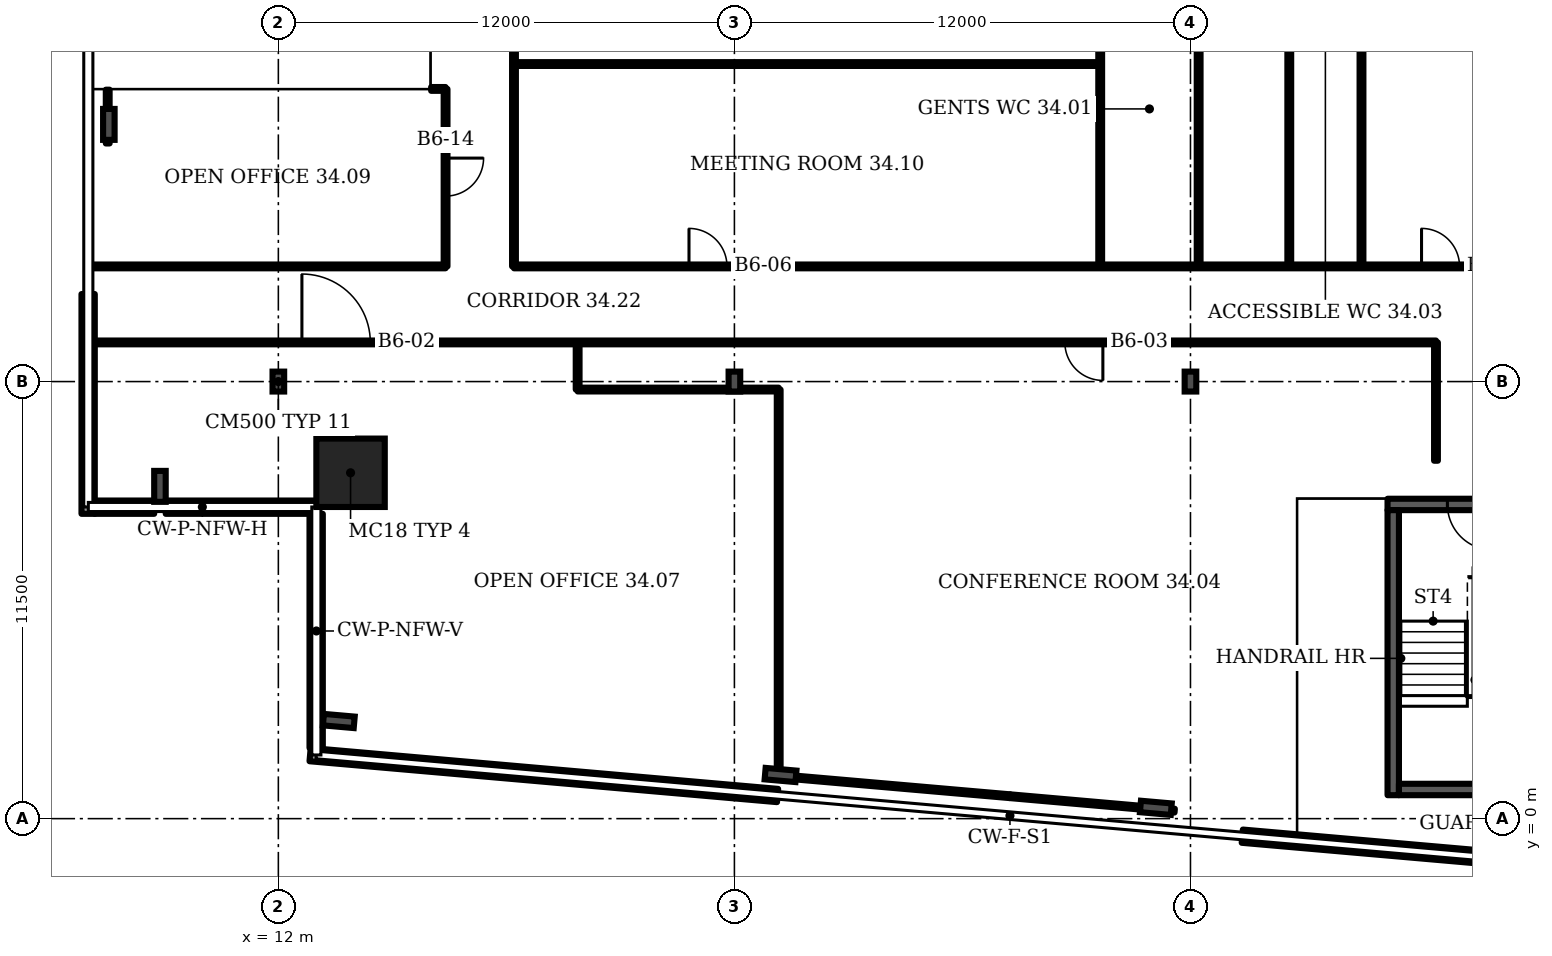
"""IFC4 building model, lengths in metres.
Left out: names, types, materials, properties, quantities, classifications, styles, units other than length and angle.
Written with IfcOpenShell. Run it as: python <this file> out.ifc"""

import sys

from ifc_helpers import new_model, si_unit, direction, frame, frame_2d, origin, origin_2d, place, context, subcontext, project, spatial, rectangle, i_section, extrude, element, fill, save


model = new_model("IFC4")
c1 = context("Model", 3, precision=1e-05, world=origin(), true_north=direction((0.0, 1.0)))
c2 = subcontext(c1, "Body", "Model", "MODEL_VIEW")
j1 = project(units=[si_unit("LENGTHUNIT", "METRE"), si_unit("PLANEANGLEUNIT", "RADIAN")], contexts=[c1])
p1 = place(None, origin())
s1 = spatial("IfcSite", under=j1, at=p1, CompositionType="ELEMENT")
p2 = place(p1, origin())
s2 = spatial("IfcBuilding", under=s1, at=p2, CompositionType="ELEMENT")
p3 = place(p2, frame((0.0, 0.0, 143.5)))
s3 = spatial("IfcBuildingStorey", under=s2, at=p3, CompositionType="ELEMENT", Elevation=143.5)
p4 = place(p3, frame((13.9, 9.1, 0.0), z_axis=(0.0, 0.0, 1.0), x_axis=(1.0, 0.0, 0.0)))
e1 = element("IfcColumn", 1, at=p4, inside=s3, PredefinedType="COLUMN", context=c2, shape_type="SweptSolid", body=[
    extrude(rectangle(XDim=1.8, YDim=1.8, at=origin_2d()), origin(), (0.0, 0.0, 1.0), 3.6),
])
for number, where, z_axis, x_axis in (
    (2, (13.591, 2.569, 0.0), (0.0, 0.0, 1.0), (-0.087, -0.996, 0.0)),
    (3, (25.214, 1.149, 0.0), (0.0, 0.0, 1.0), (-0.087, -0.996, 0.0)),
    (4, (35.089, 0.285, 0.0), (0.0, 0.0, 1.0), (-0.087, -0.996, 0.0)),
    (5, (7.54, 18.267, 0.0), (0.0, 0.0, 1.0), (-1.0, 0.0, 0.0)),
    (6, (8.885, 8.743, 0.0), (0.0, 0.0, 1.0), (-1.0, 0.0, 0.0)),
):
    element("IfcColumn", number, at=place(p3, frame(where, z_axis=z_axis, x_axis=x_axis)), inside=s3, PredefinedType="COLUMN", context=c2, shape_type="SweptSolid", body=[
        extrude(i_section(OverallWidth=0.303, OverallDepth=0.814, WebThickness=0.021, FlangeThickness=0.04, FilletRadius=0.03, at=origin_2d()), origin(), (0.0, 0.0, 1.0), 3.6),
    ])
for number, where, z_axis, x_axis in (
    (7, (12.0, 11.5, 0.0), (0.0, 0.0, 1.0), (1.0, 0.0, 0.0)),
    (8, (24.0, 11.5, 0.0), (0.0, 0.0, 1.0), (1.0, 0.0, 0.0)),
    (9, (36.0, 11.5, 0.0), (0.0, 0.0, 1.0), (1.0, 0.0, 0.0)),
):
    element("IfcColumn", number, at=place(p3, frame(where, z_axis=z_axis, x_axis=x_axis)), inside=s3, PredefinedType="COLUMN", context=c2, shape_type="SweptSolid", body=[
        extrude(i_section(OverallWidth=0.306, OverallDepth=0.524, WebThickness=0.021, FlangeThickness=0.04, FilletRadius=0.027, at=origin_2d()), origin(), (0.0, 0.0, 1.0), 3.6),
    ])
p5 = place(p3, frame((12.835, 1.685, 0.0), z_axis=(0.0, 0.0, 1.0), x_axis=(0.996192, -0.087173, 0.0)))
e10 = element("IfcWall", 10, at=p5, inside=s3, PredefinedType="SOLIDWALL", context=c2, shape_type="SweptSolid", body=[
    extrude(rectangle(XDim=12.348, YDim=0.35, at=frame_2d((6.174, 0.0))), origin(), (0.0, 0.0, 1.0), 1.0),
])
p6 = place(p3, frame((37.363, -0.461, 0.0), z_axis=(0.0, 0.0, 1.0), x_axis=(0.996194, -0.087159, 0.0)))
e11 = element("IfcWall", 11, at=p6, inside=s3, PredefinedType="SOLIDWALL", context=c2, shape_type="SweptSolid", body=[
    extrude(rectangle(XDim=12.199, YDim=0.35, at=frame_2d((6.099, 0.0))), origin(), (0.0, 0.0, 1.0), 1.0),
])
p7 = place(p3, frame((6.995, 13.803, 0.0), z_axis=(0.0, 0.0, 1.0), x_axis=(0.0, -1.0, 0.0)))
e12 = element("IfcWall", 12, at=p7, inside=s3, PredefinedType="SOLIDWALL", context=c2, shape_type="SweptSolid", body=[
    extrude(rectangle(XDim=5.783, YDim=0.35, at=frame_2d((2.892, 0.0))), origin(), (0.0, 0.0, 1.0), 1.0),
])
p8 = place(p3, frame((7.17, 8.195, 0.0), z_axis=(0.0, 0.0, 1.0), x_axis=(1.0, 0.0, 0.0)))
e13 = element("IfcWall", 13, at=p8, inside=s3, PredefinedType="SOLIDWALL", context=c2, shape_type="SweptSolid", body=[
    extrude(rectangle(XDim=1.563, YDim=0.35, at=frame_2d((0.782, 0.0))), origin(), (0.0, 0.0, 1.0), 1.0),
])
p9 = place(p3, frame((9.036, 8.195, 0.0), z_axis=(0.0, 0.0, 1.0), x_axis=(1.0, 0.0, 0.0)))
e14 = element("IfcWall", 14, at=p9, inside=s3, PredefinedType="SOLIDWALL", context=c2, shape_type="SweptSolid", body=[
    extrude(rectangle(XDim=3.964, YDim=0.35, at=frame_2d((1.982, 0.0))), origin(), (0.0, 0.0, 1.0), 1.0),
])
p10 = place(p3, frame((12.995, 8.02, 0.0), z_axis=(0.0, 0.0, 1.0), x_axis=(0.0, -1.0, 0.0)))
e15 = element("IfcWall", 15, at=p10, inside=s3, PredefinedType="SOLIDWALL", context=c2, shape_type="SweptSolid", body=[
    extrude(rectangle(XDim=6.161, YDim=0.35, at=frame_2d((3.081, 0.0))), origin(), (0.0, 0.0, 1.0), 1.0),
])
p11 = place(p3, frame((41.185, 8.267, 0.0), z_axis=(0.0, 0.0, 1.0), x_axis=(1.0, 0.0, 0.0)))
e16 = element("IfcWall", 16, at=p11, inside=s3, PredefinedType="SHEAR", context=c2, shape_type="SweptSolid", body=[
    extrude(rectangle(XDim=4.35, YDim=0.3, at=frame_2d((2.175, 0.0))), origin(), (0.0, 0.0, 1.0), 3.15),
])
p12 = place(p11, frame((1.575, 0.0, 0.0)))
e17 = element("IfcOpeningElement", 17, at=p12, cuts=e16, PredefinedType="OPENING", context=c2, shape_type="SweptSolid", body=[
    extrude(rectangle(XDim=1.2, YDim=2.1, at=frame_2d((0.6, 1.05))), frame((0.0, 0.16, 0.0), z_axis=(0.0, -1.0, 0.0), x_axis=(1.0, 0.0, 0.0)), (0.0, 0.0, 1.0), 0.32),
])
p13 = place(p3, frame((7.02, 12.53, 0.0), z_axis=(0.0, 0.0, 1.0), x_axis=(1.0, 0.0, 0.0)))
e18 = element("IfcWall", 18, at=p13, inside=s3, PredefinedType="PARTITIONING", context=c2, shape_type="SweptSolid", body=[
    extrude(rectangle(XDim=35.44, YDim=0.1, at=frame_2d((17.72, 0.0))), origin(), (0.0, 0.0, 1.0), 3.15),
])
p14 = place(p13, frame((5.6, 0.0, 0.0)))
e19 = element("IfcOpeningElement", 19, at=p14, cuts=e18, PredefinedType="OPENING", context=c2, shape_type="SweptSolid", body=[
    extrude(rectangle(XDim=1.8, YDim=2.1, at=frame_2d((0.9, 1.05))), frame((0.0, 0.06, 0.0), z_axis=(0.0, -1.0, 0.0), x_axis=(1.0, 0.0, 0.0)), (0.0, 0.0, 1.0), 0.12),
])
p15 = place(p13, frame((25.675, 0.0, 0.0)))
e20 = element("IfcOpeningElement", 20, at=p15, cuts=e18, PredefinedType="OPENING", context=c2, shape_type="SweptSolid", body=[
    extrude(rectangle(XDim=1.0, YDim=2.1, at=frame_2d((0.5, 1.05))), frame((0.0, 0.06, 0.0), z_axis=(0.0, -1.0, 0.0), x_axis=(1.0, 0.0, 0.0)), (0.0, 0.0, 1.0), 0.12),
])
p16 = place(p3, frame((7.02, 14.53, 0.0), z_axis=(0.0, 0.0, 1.0), x_axis=(1.0, 0.0, 0.0)))
e21 = element("IfcWall", 21, at=p16, inside=s3, PredefinedType="PARTITIONING", context=c2, shape_type="SweptSolid", body=[
    extrude(rectangle(XDim=9.38, YDim=0.1, at=frame_2d((4.69, 0.0))), origin(), (0.0, 0.0, 1.0), 3.15),
])
p17 = place(p3, frame((7.51, 17.765, 0.0), z_axis=(0.0, 0.0, 1.0), x_axis=(0.0, 1.0, 0.0)))
e22 = element("IfcWall", 22, at=p17, inside=s3, PredefinedType="PARTITIONING", context=c2, shape_type="SweptSolid", body=[
    extrude(rectangle(XDim=1.415, YDim=0.1, at=frame_2d((0.708, 0.0))), origin(), (0.0, 0.0, 1.0), 2.53),
])
p18 = place(p3, frame((16.02, 19.2, 0.0), z_axis=(0.0, 0.0, 1.0), x_axis=(1.0, 0.0, 0.0)))
e23 = element("IfcWall", 23, at=p18, inside=s3, PredefinedType="PARTITIONING", context=c2, shape_type="SweptSolid", body=[
    extrude(rectangle(XDim=0.38, YDim=0.1, at=frame_2d((0.19, 0.0))), origin(), (0.0, 0.0, 1.0), 3.15),
])
p19 = place(p3, frame((16.4, 14.53, 0.0), z_axis=(0.0, 0.0, 1.0), x_axis=(0.0, 1.0, 0.0)))
e24 = element("IfcWall", 24, at=p19, inside=s3, PredefinedType="PARTITIONING", context=c2, shape_type="SweptSolid", body=[
    extrude(rectangle(XDim=4.67, YDim=0.1, at=frame_2d((2.335, 0.0))), origin(), (0.0, 0.0, 1.0), 3.15),
])
p20 = place(p19, frame((1.85, 0.0, 0.0)))
e25 = element("IfcOpeningElement", 25, at=p20, cuts=e24, PredefinedType="OPENING", context=c2, shape_type="SweptSolid", body=[
    extrude(rectangle(XDim=1.0, YDim=2.1, at=frame_2d((0.5, 1.05))), frame((0.0, 0.06, 0.0), z_axis=(0.0, -1.0, 0.0), x_axis=(1.0, 0.0, 0.0)), (0.0, 0.0, 1.0), 0.12),
])
p21 = place(p3, frame((18.2, 14.53, 0.0), z_axis=(0.0, 0.0, 1.0), x_axis=(0.0, 1.0, 0.0)))
e26 = element("IfcWall", 26, at=p21, inside=s3, PredefinedType="PARTITIONING", context=c2, shape_type="SweptSolid", body=[
    extrude(rectangle(XDim=7.02, YDim=0.1, at=frame_2d((3.51, 0.0))), origin(), (0.0, 0.0, 1.0), 3.15),
])
p22 = place(p21, frame((5.745, 0.0, 0.0)))
e27 = element("IfcOpeningElement", 27, at=p22, cuts=e26, PredefinedType="OPENING", context=c2, shape_type="SweptSolid", body=[
    extrude(rectangle(XDim=1.0, YDim=2.1, at=frame_2d((0.5, 1.05))), frame((0.0, 0.06, 0.0), z_axis=(0.0, -1.0, 0.0), x_axis=(1.0, 0.0, 0.0)), (0.0, 0.0, 1.0), 0.12),
])
p23 = place(p3, frame((18.2, 14.53, 0.0), z_axis=(0.0, 0.0, 1.0), x_axis=(1.0, 0.0, 0.0)))
e28 = element("IfcWall", 28, at=p23, inside=s3, PredefinedType="PARTITIONING", context=c2, shape_type="SweptSolid", body=[
    extrude(rectangle(XDim=68.41, YDim=0.1, at=frame_2d((34.205, 0.0))), origin(), (0.0, 0.0, 1.0), 3.15),
])
p24 = place(p23, frame((4.605, 0.0, 0.0)))
e29 = element("IfcOpeningElement", 29, at=p24, cuts=e28, PredefinedType="OPENING", context=c2, shape_type="SweptSolid", body=[
    extrude(rectangle(XDim=1.0, YDim=2.1, at=frame_2d((0.5, 1.05))), frame((0.0, 0.06, 0.0), z_axis=(0.0, -1.0, 0.0), x_axis=(1.0, 0.0, 0.0)), (0.0, 0.0, 1.0), 0.12),
])
p25 = place(p23, frame((23.88, 0.0, 0.0)))
e30 = element("IfcOpeningElement", 30, at=p25, cuts=e28, PredefinedType="OPENING", context=c2, shape_type="SweptSolid", body=[
    extrude(rectangle(XDim=1.0, YDim=2.1, at=frame_2d((0.5, 1.05))), frame((0.0, 0.06, 0.0), z_axis=(0.0, -1.0, 0.0), x_axis=(1.0, 0.0, 0.0)), (0.0, 0.0, 1.0), 0.12),
])
p26 = place(p23, frame((27.8, 0.0, 0.0)))
e31 = element("IfcOpeningElement", 31, at=p26, cuts=e28, PredefinedType="OPENING", context=c2, shape_type="SweptSolid", body=[
    extrude(rectangle(XDim=1.0, YDim=2.1, at=frame_2d((0.5, 1.05))), frame((0.0, 0.06, 0.0), z_axis=(0.0, -1.0, 0.0), x_axis=(1.0, 0.0, 0.0)), (0.0, 0.0, 1.0), 0.12),
])
p27 = place(p23, frame((31.8, 0.0, 0.0)))
e32 = element("IfcOpeningElement", 32, at=p27, cuts=e28, PredefinedType="OPENING", context=c2, shape_type="SweptSolid", body=[
    extrude(rectangle(XDim=1.0, YDim=2.1, at=frame_2d((0.5, 1.05))), frame((0.0, 0.06, 0.0), z_axis=(0.0, -1.0, 0.0), x_axis=(1.0, 0.0, 0.0)), (0.0, 0.0, 1.0), 0.12),
])
p28 = place(p23, frame((35.8, 0.0, 0.0)))
e33 = element("IfcOpeningElement", 33, at=p28, cuts=e28, PredefinedType="OPENING", context=c2, shape_type="SweptSolid", body=[
    extrude(rectangle(XDim=1.0, YDim=2.1, at=frame_2d((0.5, 1.05))), frame((0.0, 0.06, 0.0), z_axis=(0.0, -1.0, 0.0), x_axis=(1.0, 0.0, 0.0)), (0.0, 0.0, 1.0), 0.12),
])
p29 = place(p23, frame((41.355, 0.0, 0.0)))
e34 = element("IfcOpeningElement", 34, at=p29, cuts=e28, PredefinedType="OPENING", context=c2, shape_type="SweptSolid", body=[
    extrude(rectangle(XDim=1.0, YDim=2.1, at=frame_2d((0.5, 1.05))), frame((0.0, 0.06, 0.0), z_axis=(0.0, -1.0, 0.0), x_axis=(1.0, 0.0, 0.0)), (0.0, 0.0, 1.0), 0.12),
])
p30 = place(p23, frame((50.88, 0.0, 0.0)))
e35 = element("IfcOpeningElement", 35, at=p30, cuts=e28, PredefinedType="OPENING", context=c2, shape_type="SweptSolid", body=[
    extrude(rectangle(XDim=1.8, YDim=2.1, at=frame_2d((0.9, 1.05))), frame((0.0, 0.06, 0.0), z_axis=(0.0, -1.0, 0.0), x_axis=(1.0, 0.0, 0.0)), (0.0, 0.0, 1.0), 0.12),
])
p31 = place(p23, frame((62.796, 0.0, 0.0)))
e36 = element("IfcOpeningElement", 36, at=p31, cuts=e28, PredefinedType="OPENING", context=c2, shape_type="SweptSolid", body=[
    extrude(rectangle(XDim=1.0, YDim=2.1, at=frame_2d((0.5, 1.05))), frame((0.0, 0.06, 0.0), z_axis=(0.0, -1.0, 0.0), x_axis=(1.0, 0.0, 0.0)), (0.0, 0.0, 1.0), 0.12),
])
p32 = place(p3, frame((18.2, 19.855, 0.0), z_axis=(0.0, 0.0, 1.0), x_axis=(1.0, 0.0, 0.0)))
e37 = element("IfcWall", 37, at=p32, inside=s3, PredefinedType="PARTITIONING", context=c2, shape_type="SweptSolid", body=[
    extrude(rectangle(XDim=15.425, YDim=0.1, at=frame_2d((7.712, 0.0))), origin(), (0.0, 0.0, 1.0), 3.15),
])
p33 = place(p3, frame((19.875, 11.29, 0.0), z_axis=(0.0, 0.0, 1.0), x_axis=(0.0, 1.0, 0.0)))
e38 = element("IfcWall", 38, at=p33, inside=s3, PredefinedType="PARTITIONING", context=c2, shape_type="SweptSolid", body=[
    extrude(rectangle(XDim=1.24, YDim=0.1, at=frame_2d((0.62, 0.0))), origin(), (0.0, 0.0, 1.0), 3.15),
])
p34 = place(p3, frame((19.875, 11.29, 0.0), z_axis=(0.0, 0.0, 1.0), x_axis=(1.0, 0.0, 0.0)))
e39 = element("IfcWall", 39, at=p34, inside=s3, PredefinedType="PARTITIONING", context=c2, shape_type="SweptSolid", body=[
    extrude(rectangle(XDim=5.29, YDim=0.1, at=frame_2d((2.645, 0.0))), origin(), (0.0, 0.0, 1.0), 3.15),
])
p35 = place(p3, frame((25.165, 1.12, 0.0), z_axis=(0.0, 0.0, 1.0), x_axis=(0.0, 1.0, 0.0)))
e40 = element("IfcWall", 40, at=p35, inside=s3, PredefinedType="PARTITIONING", context=c2, shape_type="SweptSolid", body=[
    extrude(rectangle(XDim=10.17, YDim=0.1, at=frame_2d((5.085, 0.0))), origin(), (0.0, 0.0, 1.0), 3.15),
])
p36 = place(p3, frame((31.25, 0.59, 0.0), z_axis=(0.0, 0.0, 1.0), x_axis=(-0.996225, 0.086776, 0.0)))
e41 = element("IfcWall", 41, at=p36, inside=s3, PredefinedType="PARTITIONING", context=c2, shape_type="SweptSolid", body=[
    extrude(rectangle(XDim=6.108, YDim=0.1, at=frame_2d((3.054, 0.0))), origin(), (0.0, 0.0, 1.0), 2.53),
])
p37 = place(p3, frame((33.625, 14.53, 0.0), z_axis=(0.0, 0.0, 1.0), x_axis=(0.0, 1.0, 0.0)))
e42 = element("IfcWall", 42, at=p37, inside=s3, PredefinedType="PARTITIONING", context=c2, shape_type="SweptSolid", body=[
    extrude(rectangle(XDim=15.96, YDim=0.1, at=frame_2d((7.98, 0.0))), origin(), (0.0, 0.0, 1.0), 3.15),
])
p38 = place(p3, frame((35.585, 0.21, 0.0), z_axis=(0.0, 0.0, 1.0), x_axis=(-0.996173, 0.087353, 0.0)))
e43 = element("IfcWall", 43, at=p38, inside=s3, PredefinedType="PARTITIONING", context=c2, shape_type="SweptSolid", body=[
    extrude(rectangle(XDim=4.352, YDim=0.1, at=frame_2d((2.176, 0.0))), origin(), (0.0, 0.0, 1.0), 2.53),
])
for number, where, z_axis, x_axis in (
    (44, (36.215, 14.53, 0.0), (0.0, 0.0, 1.0), (0.0, 1.0, 0.0)),
    (45, (38.6, 14.53, 0.0), (0.0, 0.0, 1.0), (0.0, 1.0, 0.0)),
    (46, (40.5, 14.53, 0.0), (0.0, 0.0, 1.0), (0.0, 1.0, 0.0)),
):
    element("IfcWall", number, at=place(p3, frame(where, z_axis=z_axis, x_axis=x_axis)), inside=s3, PredefinedType="PARTITIONING", context=c2, shape_type="SweptSolid", body=[
        extrude(rectangle(XDim=14.17, YDim=0.1, at=frame_2d((7.085, 0.0))), origin(), (0.0, 0.0, 1.0), 3.15),
    ])
p39 = place(p3, frame((42.46, 9.417, 0.0), z_axis=(0.0, 0.0, 1.0), x_axis=(0.0, 1.0, 0.0)))
e47 = element("IfcWall", 47, at=p39, inside=s3, PredefinedType="PARTITIONING", context=c2, shape_type="SweptSolid", body=[
    extrude(rectangle(XDim=3.113, YDim=0.1, at=frame_2d((1.557, 0.0))), origin(), (0.0, 0.0, 1.0), 3.15),
])
p40 = place(p3, frame((41.335, 0.617, 0.0), z_axis=(0.0, 0.0, 1.0), x_axis=(0.0, 1.0, 0.0)))
e48 = element("IfcWall", 48, at=p40, inside=s3, PredefinedType="SHEAR", context=c2, shape_type="SweptSolid", body=[
    extrude(rectangle(XDim=7.5, YDim=0.3, at=frame_2d((3.75, 0.0))), origin(), (0.0, 0.0, 1.0), 3.15),
])
p41 = place(p3, frame((41.485, 0.767, 0.0), z_axis=(0.0, 0.0, 1.0), x_axis=(1.0, 0.0, 0.0)))
e49 = element("IfcWall", 49, at=p41, inside=s3, PredefinedType="SHEAR", context=c2, shape_type="SweptSolid", body=[
    extrude(rectangle(XDim=3.75, YDim=0.3, at=frame_2d((1.875, 0.0))), origin(), (0.0, 0.0, 1.0), 3.15),
])
p42 = place(p12, origin())
e50 = element("IfcDoor", 50, at=p42, inside=s3, OperationType="SINGLE_SWING_RIGHT", PredefinedType="DOOR", context=c2, shape_type="SweptSolid", body=[
    extrude(rectangle(XDim=1.2, YDim=2.1, at=frame_2d((0.6, 1.05))), frame((0.0, 0.025, 0.0), z_axis=(0.0, -1.0, 0.0), x_axis=(1.0, 0.0, 0.0)), (0.0, 0.0, 1.0), 0.05),
])
fill(e17, e50)
p43 = place(p14, origin())
e51 = element("IfcDoor", 51, at=p43, inside=s3, OperationType="DOUBLE_DOOR_SINGLE_SWING", PredefinedType="DOOR", context=c2, shape_type="SweptSolid", body=[
    extrude(rectangle(XDim=1.8, YDim=2.1, at=frame_2d((0.9, 1.05))), frame((0.0, 0.025, 0.0), z_axis=(0.0, -1.0, 0.0), x_axis=(1.0, 0.0, 0.0)), (0.0, 0.0, 1.0), 0.05),
])
fill(e19, e51)
p44 = place(p15, origin())
e52 = element("IfcDoor", 52, at=p44, inside=s3, OperationType="SINGLE_SWING_RIGHT", PredefinedType="DOOR", context=c2, shape_type="SweptSolid", body=[
    extrude(rectangle(XDim=1.0, YDim=2.1, at=frame_2d((0.5, 1.05))), frame((0.0, 0.025, 0.0), z_axis=(0.0, -1.0, 0.0), x_axis=(1.0, 0.0, 0.0)), (0.0, 0.0, 1.0), 0.05),
])
fill(e20, e52)
p45 = place(p24, origin())
e53 = element("IfcDoor", 53, at=p45, inside=s3, OperationType="SINGLE_SWING_LEFT", PredefinedType="DOOR", context=c2, shape_type="SweptSolid", body=[
    extrude(rectangle(XDim=1.0, YDim=2.1, at=frame_2d((0.5, 1.05))), frame((0.0, 0.025, 0.0), z_axis=(0.0, -1.0, 0.0), x_axis=(1.0, 0.0, 0.0)), (0.0, 0.0, 1.0), 0.05),
])
fill(e29, e53)
p46 = place(p25, origin())
e54 = element("IfcDoor", 54, at=p46, inside=s3, OperationType="SINGLE_SWING_LEFT", PredefinedType="DOOR", context=c2, shape_type="SweptSolid", body=[
    extrude(rectangle(XDim=1.0, YDim=2.1, at=frame_2d((0.5, 1.05))), frame((0.0, 0.025, 0.0), z_axis=(0.0, -1.0, 0.0), x_axis=(1.0, 0.0, 0.0)), (0.0, 0.0, 1.0), 0.05),
])
fill(e30, e54)
p47 = place(p20, origin())
e55 = element("IfcDoor", 55, at=p47, inside=s3, OperationType="SINGLE_SWING_RIGHT", PredefinedType="DOOR", context=c2, shape_type="SweptSolid", body=[
    extrude(rectangle(XDim=1.0, YDim=2.1, at=frame_2d((0.5, 1.05))), frame((0.0, 0.025, 0.0), z_axis=(0.0, -1.0, 0.0), x_axis=(1.0, 0.0, 0.0)), (0.0, 0.0, 1.0), 0.05),
])
fill(e25, e55)
save(model, sys.argv[1])
